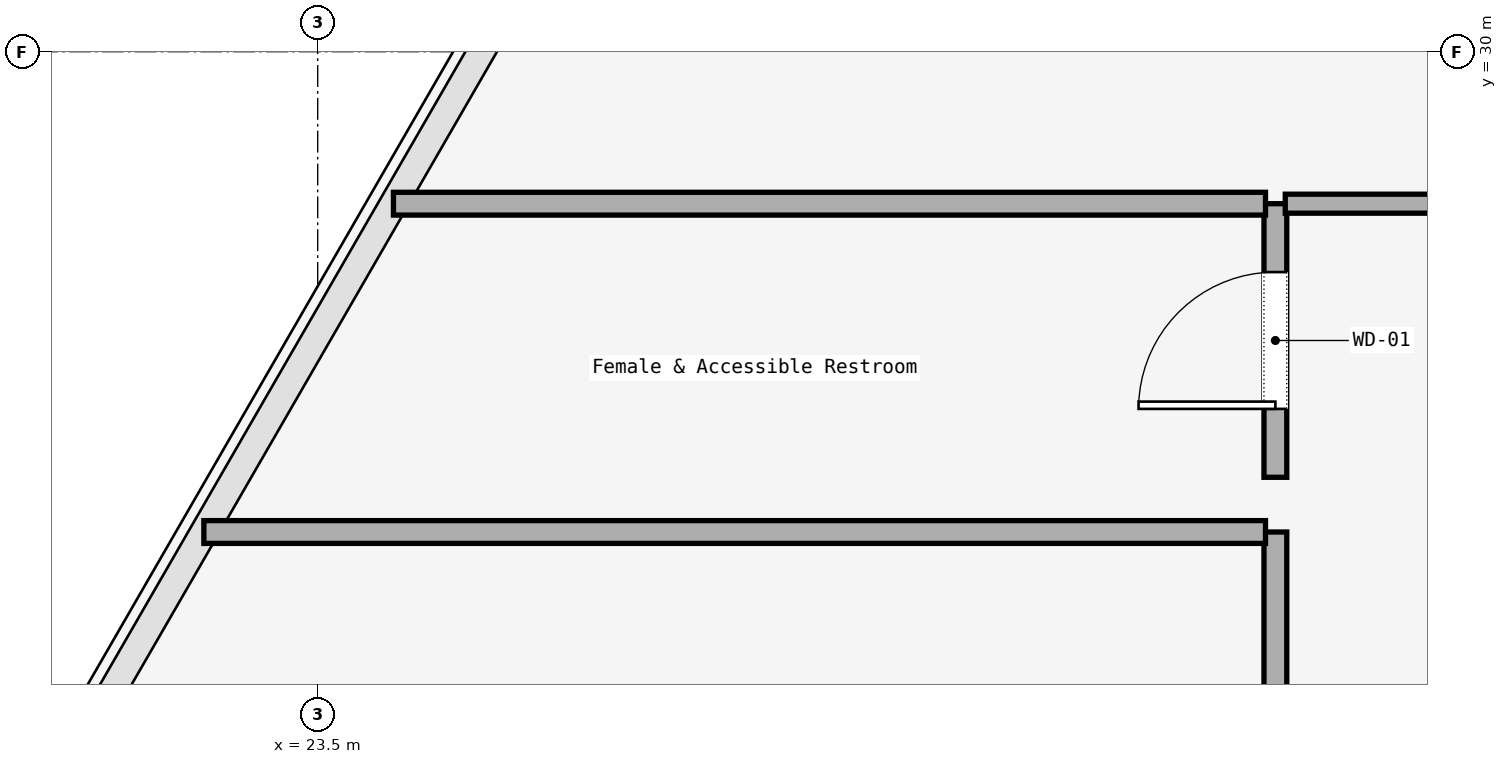
"""IFC4 building model, lengths in metres.
Left out: names, types, materials, properties, quantities, classifications, styles, units other than length and angle.
Written with IfcOpenShell. Run it as: python <this file> out.ifc"""

import sys

from ifc_helpers import new_model, si_unit, direction, frame, frame_2d, origin, place, context, subcontext, project, spatial, rectangle, extrude, element, fill, save


model = new_model("IFC4")
c1 = context("Model", 3, precision=1e-05, world=origin(), true_north=direction((0.0, 1.0)))
c2 = subcontext(c1, "Body", "Model", "MODEL_VIEW")
j1 = project(units=[si_unit("LENGTHUNIT", "METRE"), si_unit("PLANEANGLEUNIT", "RADIAN")], contexts=[c1])
p1 = place(None, origin())
s1 = spatial("IfcSite", under=j1, at=p1, CompositionType="ELEMENT")
p2 = place(p1, origin())
s2 = spatial("IfcBuilding", under=s1, at=p2, CompositionType="ELEMENT")
p3 = place(p2, frame((0.0, 0.0, 36.0)))
s3 = spatial("IfcBuildingStorey", under=s2, at=p3, CompositionType="ELEMENT", Elevation=36.0)
p4 = place(p3, frame((29.8, 17.065, 0.0), z_axis=(0.0, 0.0, 1.0), x_axis=(0.0, 1.0, 0.0)))
e1 = element("IfcWall", 1, at=p4, inside=s3, PredefinedType="PARTITIONING", context=c2, shape_type="SweptSolid", body=[
    extrude(rectangle(XDim=9.775, YDim=0.15, at=frame_2d((4.888, 0.0))), origin(), (0.0, 0.0, 1.0), 2.933),
])
p5 = place(p4, frame((4.413, 0.0, 0.0)))
e2 = element("IfcOpeningElement", 2, at=p5, cuts=e1, PredefinedType="OPENING", context=c2, shape_type="SweptSolid", body=[
    extrude(rectangle(XDim=0.95, YDim=2.2, at=frame_2d((0.475, 1.1))), frame((0.0, 0.075, 0.0), z_axis=(0.0, -1.0, 0.0), x_axis=(1.0, 0.0, 0.0)), (0.0, 0.0, 1.0), 0.15),
])
p6 = place(p3, frame((29.8, 27.2, 0.0), z_axis=(0.0, 0.0, 1.0), x_axis=(0.0, 1.0, 0.0)))
e3 = element("IfcWall", 3, at=p6, inside=s3, PredefinedType="PARTITIONING", context=c2, shape_type="SweptSolid", body=[
    extrude(rectangle(XDim=1.8, YDim=0.15, at=frame_2d((0.9, 0.0))), origin(), (0.0, 0.0, 1.0), 2.933),
])
p7 = place(p6, frame((0.45, 0.0, 0.0)))
e4 = element("IfcOpeningElement", 4, at=p7, cuts=e3, PredefinedType="OPENING", context=c2, shape_type="SweptSolid", body=[
    extrude(rectangle(XDim=0.9, YDim=2.15, at=frame_2d((0.45, 1.075))), frame((0.0, 0.075, 0.0), z_axis=(0.0, -1.0, 0.0), x_axis=(1.0, 0.0, 0.0)), (0.0, 0.0, 1.0), 0.15),
])
p8 = place(p3, frame((29.865, 29.0, 0.0), z_axis=(0.0, 0.0, 1.0), x_axis=(1.0, 0.0, 0.0)))
e5 = element("IfcWall", 5, at=p8, inside=s3, PredefinedType="PARTITIONING", context=c2, shape_type="SweptSolid", body=[
    extrude(rectangle(XDim=1.735, YDim=0.125, at=frame_2d((0.868, 0.0))), origin(), (0.0, 0.0, 1.0), 2.933),
])
p9 = place(p3, frame((22.751, 26.84, 0.0), z_axis=(0.0, 0.0, 1.0), x_axis=(1.0, 0.0, 0.0)))
e6 = element("IfcWall", 6, at=p9, inside=s3, PredefinedType="PARTITIONING", context=c2, shape_type="SweptSolid", body=[
    extrude(rectangle(XDim=6.984, YDim=0.15, at=frame_2d((3.492, 0.0))), origin(), (0.0, 0.0, 1.0), 2.933),
])
p10 = place(p3, frame((23.998, 29.0, 0.0), z_axis=(0.0, 0.0, 1.0), x_axis=(1.0, 0.0, 0.0)))
e7 = element("IfcWall", 7, at=p10, inside=s3, PredefinedType="PARTITIONING", context=c2, shape_type="SweptSolid", body=[
    extrude(rectangle(XDim=5.737, YDim=0.15, at=frame_2d((2.868, 0.0))), origin(), (0.0, 0.0, 1.0), 2.933),
])
p11 = place(p7, origin())
e8 = element("IfcDoor", 8, at=p11, inside=s3, OperationType="SINGLE_SWING_RIGHT", PredefinedType="DOOR", context=c2, shape_type="SweptSolid", body=[
    extrude(rectangle(XDim=0.9, YDim=2.15, at=frame_2d((0.45, 1.075))), frame((0.0, 0.025, 0.0), z_axis=(0.0, -1.0, 0.0), x_axis=(1.0, 0.0, 0.0)), (0.0, 0.0, 1.0), 0.05),
])
fill(e4, e8)
save(model, sys.argv[1])
